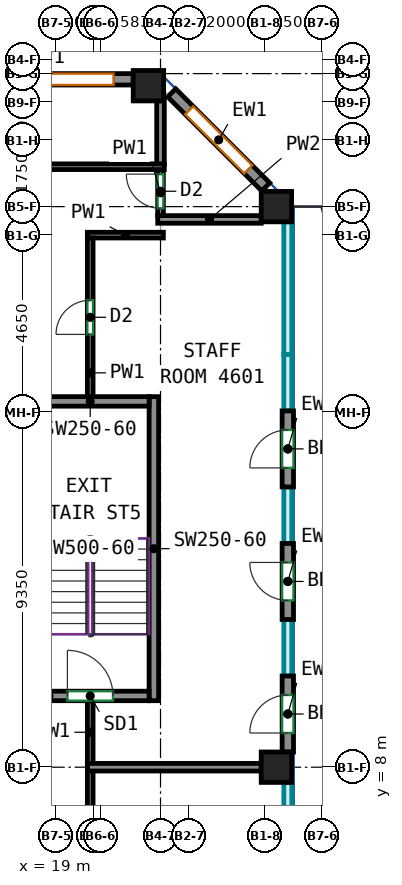
"""IFC4 building model, lengths in metres.
Left out: names, types, materials, properties, quantities, classifications, styles, units other than length and angle.
Written with IfcOpenShell. Run it as: python <this file> out.ifc"""

import sys

from ifc_helpers import new_model, si_unit, direction, frame, frame_2d, origin, origin_2d, place, context, subcontext, project, spatial, rectangle, extrude, source, transform, mapped, element, fill, save


model = new_model("IFC4")
c1 = context("Model", 3, precision=1e-05, world=origin(), true_north=direction((0.0, 1.0)))
c2 = subcontext(c1, "Body", "Model", "MODEL_VIEW")
j1 = project(units=[si_unit("LENGTHUNIT", "METRE"), si_unit("PLANEANGLEUNIT", "RADIAN")], contexts=[c1])
p1 = place(None, origin())
s1 = spatial("IfcSite", under=j1, at=p1, CompositionType="ELEMENT")
p2 = place(p1, origin())
s2 = spatial("IfcBuilding", under=s1, at=p2, CompositionType="ELEMENT")
p3 = place(p2, frame((0.0, 0.0, 192.3)))
s3 = spatial("IfcBuildingStorey", under=s2, at=p3, CompositionType="ELEMENT", Elevation=192.3)
m1 = source(origin(), c2, "Body", "SweptSolid", [
    extrude(rectangle(XDim=0.8, YDim=0.8, at=origin_2d()), origin(), (0.0, 0.0, 1.0), 3.0),
])
for number, where, z_axis, x_axis in (
    (1, (21.432, 25.932, 0.0), (0.0, 0.0, 1.0), (1.0, 0.0, 0.0)),
    (2, (24.8, 8.0, 0.0), (0.0, 0.0, 1.0), (1.0, 0.0, 0.0)),
    (3, (24.8, 22.75, 0.0), (0.0, 0.0, 1.0), (1.0, 0.0, 0.0)),
):
    element("IfcColumn", number, at=place(p3, frame(where, z_axis=z_axis, x_axis=x_axis)), inside=s3, PredefinedType="COLUMN", context=c2, shape_type="MappedRepresentation", body=[
        mapped(m1, transform((0.0, 0.0, 0.0))),
    ])
m2 = source(origin(), c2, "Body", "SweptSolid", [
    extrude(rectangle(XDim=8.0, YDim=0.25, at=frame_2d((4.0, 0.0))), origin(), (0.0, 0.0, 1.0), 3.0),
])
p4 = place(p3, frame((21.575, 9.75, 0.0), z_axis=(0.0, 0.0, 1.0), x_axis=(0.0, 1.0, 0.0)))
e4 = element("IfcWall", 4, at=p4, inside=s3, PredefinedType="SHEAR", context=c2, shape_type="MappedRepresentation", body=[
    mapped(m2, transform((0.0, 0.0, 0.0))),
])
m3 = source(origin(), c2, "Body", "SweptSolid", [
    extrude(rectangle(XDim=3.1, YDim=0.25, at=frame_2d((1.55, 0.0))), origin(), (0.0, 0.0, 1.0), 3.0),
])
p5 = place(p3, frame((18.35, 9.875, 0.0), z_axis=(0.0, 0.0, 1.0), x_axis=(1.0, 0.0, 0.0)))
e5 = element("IfcWall", 5, at=p5, inside=s3, PredefinedType="SHEAR", context=c2, shape_type="MappedRepresentation", body=[
    mapped(m3, transform((0.0, 0.0, 0.0))),
])
p6 = place(p5, frame((0.95, 0.0, 0.0)))
e6 = element("IfcOpeningElement", 6, at=p6, cuts=e5, PredefinedType="OPENING", context=c2, shape_type="SweptSolid", body=[
    extrude(rectangle(XDim=1.2, YDim=2.1, at=frame_2d((0.6, 1.05))), frame((0.0, 0.135, 0.0), z_axis=(0.0, -1.0, 0.0), x_axis=(1.0, 0.0, 0.0)), (0.0, 0.0, 1.0), 0.27),
])
p7 = place(p3, frame((18.35, 17.625, 0.0), z_axis=(0.0, 0.0, 1.0), x_axis=(1.0, 0.0, 0.0)))
e7 = element("IfcWall", 7, at=p7, inside=s3, PredefinedType="SHEAR", context=c2, shape_type="MappedRepresentation", body=[
    mapped(m3, transform((0.0, 0.0, 0.0))),
])
m4 = source(origin(), c2, "Body", "SweptSolid", [
    extrude(rectangle(XDim=2.0, YDim=0.3, at=frame_2d((1.0, 0.0))), origin(), (0.0, 0.0, 1.0), 3.0),
])
p8 = place(p3, frame((25.1, 8.4, 0.0), z_axis=(0.0, 0.0, 1.0), x_axis=(0.0, 1.0, 0.0)))
e8 = element("IfcWall", 8, at=p8, inside=s3, PredefinedType="SOLIDWALL", context=c2, shape_type="MappedRepresentation", body=[
    mapped(m4, transform((0.0, 0.0, 0.0))),
])
p9 = place(p8, frame((0.5, 0.0, 0.0)))
e9 = element("IfcOpeningElement", 9, at=p9, cuts=e8, PredefinedType="OPENING", context=c2, shape_type="SweptSolid", body=[
    extrude(rectangle(XDim=1.0, YDim=2.1, at=frame_2d((0.5, 1.05))), frame((0.0, 0.16, 0.0), z_axis=(0.0, -1.0, 0.0), x_axis=(1.0, 0.0, 0.0)), (0.0, 0.0, 1.0), 0.32),
])
p10 = place(p3, frame((25.1, 11.887, 0.0), z_axis=(0.0, 0.0, 1.0), x_axis=(0.0, 1.0, 0.0)))
e10 = element("IfcWall", 10, at=p10, inside=s3, PredefinedType="SOLIDWALL", context=c2, shape_type="MappedRepresentation", body=[
    mapped(m4, transform((0.0, 0.0, 0.0))),
])
p11 = place(p10, frame((0.5, 0.0, 0.0)))
e11 = element("IfcOpeningElement", 11, at=p11, cuts=e10, PredefinedType="OPENING", context=c2, shape_type="SweptSolid", body=[
    extrude(rectangle(XDim=1.0, YDim=2.1, at=frame_2d((0.5, 1.05))), frame((0.0, 0.16, 0.0), z_axis=(0.0, -1.0, 0.0), x_axis=(1.0, 0.0, 0.0)), (0.0, 0.0, 1.0), 0.32),
])
p12 = place(p3, frame((25.1, 15.375, 0.0), z_axis=(0.0, 0.0, 1.0), x_axis=(0.0, 1.0, 0.0)))
e12 = element("IfcWall", 12, at=p12, inside=s3, PredefinedType="SOLIDWALL", context=c2, shape_type="MappedRepresentation", body=[
    mapped(m4, transform((0.0, 0.0, 0.0))),
])
p13 = place(p12, frame((0.5, 0.0, 0.0)))
e13 = element("IfcOpeningElement", 13, at=p13, cuts=e12, PredefinedType="OPENING", context=c2, shape_type="SweptSolid", body=[
    extrude(rectangle(XDim=1.0, YDim=2.1, at=frame_2d((0.5, 1.05))), frame((0.0, 0.16, 0.0), z_axis=(0.0, -1.0, 0.0), x_axis=(1.0, 0.0, 0.0)), (0.0, 0.0, 1.0), 0.32),
])
m5 = source(origin(), c2, "Body", "SweptSolid", [
    extrude(rectangle(XDim=3.5, YDim=0.3, at=frame_2d((1.75, 0.0))), origin(), (0.0, 0.0, 1.0), 3.0),
])
p14 = place(p3, frame((24.519, 23.269, 0.0), z_axis=(0.0, 0.0, 1.0), x_axis=(-0.70707190453, 0.707141656123, 0.0)))
e14 = element("IfcWall", 14, at=p14, inside=s3, PredefinedType="SOLIDWALL", context=c2, shape_type="MappedRepresentation", body=[
    mapped(m5, transform((0.0, 0.0, 0.0))),
])
p15 = place(p14, frame((0.65, 0.0, 0.85)))
e15 = element("IfcOpeningElement", 15, at=p15, cuts=e14, PredefinedType="OPENING", context=c2, shape_type="SweptSolid", body=[
    extrude(rectangle(XDim=2.2, YDim=1.95, at=frame_2d((1.1, 0.975))), frame((0.0, 0.16, 0.0), z_axis=(0.0, -1.0, 0.0), x_axis=(1.0, 0.0, 0.0)), (0.0, 0.0, 1.0), 0.32),
])
m6 = source(origin(), c2, "Body", "SweptSolid", [
    extrude(rectangle(XDim=6.465, YDim=0.3, at=frame_2d((3.232, 0.0))), origin(), (0.0, 0.0, 1.0), 3.0),
])
p16 = place(p3, frame((21.032, 26.1, 0.0), z_axis=(0.0, 0.0, 1.0), x_axis=(-1.0, 0.0, 0.0)))
e16 = element("IfcWall", 16, at=p16, inside=s3, PredefinedType="SOLIDWALL", context=c2, shape_type="MappedRepresentation", body=[
    mapped(m6, transform((0.0, 0.0, 0.0))),
])
p17 = place(p16, frame((0.516, 0.0, 0.85)))
e17 = element("IfcOpeningElement", 17, at=p17, cuts=e16, PredefinedType="OPENING", context=c2, shape_type="SweptSolid", body=[
    extrude(rectangle(XDim=2.2, YDim=1.95, at=frame_2d((1.1, 0.975))), frame((0.0, 0.16, 0.0), z_axis=(0.0, -1.0, 0.0), x_axis=(1.0, 0.0, 0.0)), (0.0, 0.0, 1.0), 0.32),
])
p18 = place(p16, frame((3.749, 0.0, 0.85)))
e18 = element("IfcOpeningElement", 18, at=p18, cuts=e16, PredefinedType="OPENING", context=c2, shape_type="SweptSolid", body=[
    extrude(rectangle(XDim=2.2, YDim=1.95, at=frame_2d((1.1, 0.975))), frame((0.0, 0.16, 0.0), z_axis=(0.0, -1.0, 0.0), x_axis=(1.0, 0.0, 0.0)), (0.0, 0.0, 1.0), 0.32),
])
p19 = place(p3, frame((19.9, 3.809, 0.0), z_axis=(0.0, 0.0, 1.0), x_axis=(0.0, 1.0, 0.0)))
e19 = element("IfcWall", 19, at=p19, inside=s3, PredefinedType="PARTITIONING", context=c2, shape_type="SweptSolid", body=[
    extrude(rectangle(XDim=4.101, YDim=0.15, at=frame_2d((2.05, 0.0))), origin(), (0.0, 0.0, 1.0), 3.0),
])
p20 = place(p19, frame((1.1, 0.0, 0.0)))
e20 = element("IfcOpeningElement", 20, at=p20, cuts=e19, PredefinedType="OPENING", context=c2, shape_type="SweptSolid", body=[
    extrude(rectangle(XDim=0.9, YDim=2.1, at=frame_2d((0.45, 1.05))), frame((0.0, 0.085, 0.0), z_axis=(0.0, -1.0, 0.0), x_axis=(1.0, 0.0, 0.0)), (0.0, 0.0, 1.0), 0.17),
])
p21 = place(p3, frame((19.825, 22.0, 0.0), z_axis=(0.0, 0.0, 1.0), x_axis=(1.0, 0.0, 0.0)))
e21 = element("IfcWall", 21, at=p21, inside=s3, PredefinedType="PARTITIONING", context=c2, shape_type="SweptSolid", body=[
    extrude(rectangle(XDim=2.0, YDim=0.15, at=frame_2d((1.0, 0.0))), origin(), (0.0, 0.0, 1.0), 3.0),
])
p22 = place(p3, frame((19.9, 17.75, 0.0), z_axis=(0.0, 0.0, 1.0), x_axis=(0.0, 1.0, 0.0)))
e22 = element("IfcWall", 22, at=p22, inside=s3, PredefinedType="PARTITIONING", context=c2, shape_type="SweptSolid", body=[
    extrude(rectangle(XDim=4.175, YDim=0.15, at=frame_2d((2.087, 0.0))), origin(), (0.0, 0.0, 1.0), 3.0),
])
p23 = place(p22, frame((1.638, 0.0, 0.0)))
e23 = element("IfcOpeningElement", 23, at=p23, cuts=e22, PredefinedType="OPENING", context=c2, shape_type="SweptSolid", body=[
    extrude(rectangle(XDim=0.9, YDim=2.1, at=frame_2d((0.45, 1.05))), frame((0.0, 0.085, 0.0), z_axis=(0.0, -1.0, 0.0), x_axis=(1.0, 0.0, 0.0)), (0.0, 0.0, 1.0), 0.17),
])
p24 = place(p3, frame((19.9, 8.09, 0.0), z_axis=(0.0, 0.0, 1.0), x_axis=(0.0, 1.0, 0.0)))
e24 = element("IfcWall", 24, at=p24, inside=s3, PredefinedType="PARTITIONING", context=c2, shape_type="SweptSolid", body=[
    extrude(rectangle(XDim=1.66, YDim=0.15, at=frame_2d((0.83, 0.0))), origin(), (0.0, 0.0, 1.0), 3.0),
])
p25 = place(p3, frame((21.75, 22.503, 0.0), z_axis=(0.0, 0.0, 1.0), x_axis=(0.0, 1.0, 0.0)))
e25 = element("IfcWall", 25, at=p25, inside=s3, PredefinedType="PARTITIONING", context=c2, shape_type="SweptSolid", body=[
    extrude(rectangle(XDim=1.222, YDim=0.15, at=frame_2d((0.611, 0.0))), origin(), (0.0, 0.0, 1.0), 3.0),
])
p26 = place(p25, frame((0.202, 0.0, 0.0)))
e26 = element("IfcOpeningElement", 26, at=p26, cuts=e25, PredefinedType="OPENING", context=c2, shape_type="SweptSolid", body=[
    extrude(rectangle(XDim=0.9, YDim=2.1, at=frame_2d((0.45, 1.05))), frame((0.0, 0.085, 0.0), z_axis=(0.0, -1.0, 0.0), x_axis=(1.0, 0.0, 0.0)), (0.0, 0.0, 1.0), 0.17),
])
p27 = place(p3, frame((-20.059, 23.8, 0.0), z_axis=(0.0, 0.0, 1.0), x_axis=(1.0, 0.0, 0.0)))
e27 = element("IfcWall", 27, at=p27, inside=s3, PredefinedType="PARTITIONING", context=c2, shape_type="SweptSolid", body=[
    extrude(rectangle(XDim=41.909, YDim=0.15, at=frame_2d((20.955, 0.0))), origin(), (0.0, 0.0, 1.0), 3.0),
])
p28 = place(p27, frame((4.718, 0.0, 0.0)))
e28 = element("IfcOpeningElement", 28, at=p28, cuts=e27, PredefinedType="OPENING", context=c2, shape_type="SweptSolid", body=[
    extrude(rectangle(XDim=0.9, YDim=2.1, at=frame_2d((0.45, 1.05))), frame((0.0, 0.085, 0.0), z_axis=(0.0, -1.0, 0.0), x_axis=(1.0, 0.0, 0.0)), (0.0, 0.0, 1.0), 0.17),
])
p29 = place(p27, frame((30.079, 0.0, 0.0)))
e29 = element("IfcOpeningElement", 29, at=p29, cuts=e27, PredefinedType="OPENING", context=c2, shape_type="SweptSolid", body=[
    extrude(rectangle(XDim=1.0, YDim=2.1, at=frame_2d((0.5, 1.05))), frame((0.0, 0.085, 0.0), z_axis=(0.0, -1.0, 0.0), x_axis=(1.0, 0.0, 0.0)), (0.0, 0.0, 1.0), 0.17),
])
p30 = place(p3, frame((19.827, 8.0, 0.0), z_axis=(0.0, 0.0, 1.0), x_axis=(1.0, 0.0, 0.0)))
e30 = element("IfcWall", 30, at=p30, inside=s3, PredefinedType="PARTITIONING", context=c2, shape_type="SweptSolid", body=[
    extrude(rectangle(XDim=4.573, YDim=0.2, at=frame_2d((2.287, 0.0))), origin(), (0.0, 0.0, 1.0), 3.0),
])
p31 = place(p3, frame((24.4, 22.413, 0.0), z_axis=(0.0, 0.0, 1.0), x_axis=(-1.0, 0.0, 0.0)))
e31 = element("IfcWall", 31, at=p31, inside=s3, PredefinedType="PARTITIONING", context=c2, shape_type="SweptSolid", body=[
    extrude(rectangle(XDim=2.723, YDim=0.2, at=frame_2d((1.361, 0.0))), origin(), (0.0, 0.0, 1.0), 2.4),
])
p32 = place(p3, frame((21.75, 25.532, 0.0), z_axis=(0.0, 0.0, 1.0), x_axis=(0.0, -1.0, 0.0)))
e32 = element("IfcWall", 32, at=p32, inside=s3, PredefinedType="PARTITIONING", context=c2, shape_type="SweptSolid", body=[
    extrude(rectangle(XDim=1.655, YDim=0.2, at=frame_2d((0.828, 0.0))), origin(), (0.0, 0.0, 1.0), 3.0),
])
p33 = place(p9, origin())
e33 = element("IfcDoor", 33, at=p33, inside=s3, OperationType="SINGLE_SWING_LEFT", PredefinedType="DOOR", context=c2, shape_type="SweptSolid", body=[
    extrude(rectangle(XDim=1.0, YDim=2.1, at=frame_2d((0.5, 1.05))), frame((0.0, 0.025, 0.0), z_axis=(0.0, -1.0, 0.0), x_axis=(1.0, 0.0, 0.0)), (0.0, 0.0, 1.0), 0.05),
])
fill(e9, e33)
p34 = place(p11, origin())
e34 = element("IfcDoor", 34, at=p34, inside=s3, OperationType="SINGLE_SWING_RIGHT", PredefinedType="DOOR", context=c2, shape_type="SweptSolid", body=[
    extrude(rectangle(XDim=1.0, YDim=2.1, at=frame_2d((0.5, 1.05))), frame((0.0, 0.025, 0.0), z_axis=(0.0, -1.0, 0.0), x_axis=(1.0, 0.0, 0.0)), (0.0, 0.0, 1.0), 0.05),
])
fill(e11, e34)
p35 = place(p13, origin())
e35 = element("IfcDoor", 35, at=p35, inside=s3, OperationType="SINGLE_SWING_LEFT", PredefinedType="DOOR", context=c2, shape_type="SweptSolid", body=[
    extrude(rectangle(XDim=1.0, YDim=2.1, at=frame_2d((0.5, 1.05))), frame((0.0, 0.025, 0.0), z_axis=(0.0, -1.0, 0.0), x_axis=(1.0, 0.0, 0.0)), (0.0, 0.0, 1.0), 0.05),
])
fill(e13, e35)
p36 = place(p15, origin())
e36 = element("IfcWindow", 36, at=p36, inside=s3, PartitioningType="SINGLE_PANEL", PredefinedType="WINDOW", context=c2, shape_type="SweptSolid", body=[
    extrude(rectangle(XDim=2.2, YDim=1.95, at=frame_2d((1.1, 0.975))), frame((0.0, 0.03, 0.0), z_axis=(0.0, -1.0, 0.0), x_axis=(1.0, 0.0, 0.0)), (0.0, 0.0, 1.0), 0.06),
])
fill(e15, e36)
p37 = place(p17, origin())
e37 = element("IfcWindow", 37, at=p37, inside=s3, PartitioningType="SINGLE_PANEL", PredefinedType="WINDOW", context=c2, shape_type="SweptSolid", body=[
    extrude(rectangle(XDim=2.2, YDim=1.95, at=frame_2d((1.1, 0.975))), frame((0.0, 0.03, 0.0), z_axis=(0.0, -1.0, 0.0), x_axis=(1.0, 0.0, 0.0)), (0.0, 0.0, 1.0), 0.06),
])
fill(e17, e37)
p38 = place(p6, origin())
e38 = element("IfcDoor", 38, at=p38, inside=s3, OperationType="DOUBLE_DOOR_SINGLE_SWING", PredefinedType="DOOR", context=c2, shape_type="SweptSolid", body=[
    extrude(rectangle(XDim=1.2, YDim=2.1, at=frame_2d((0.6, 1.05))), frame((0.0, 0.025, 0.0), z_axis=(0.0, -1.0, 0.0), x_axis=(1.0, 0.0, 0.0)), (0.0, 0.0, 1.0), 0.05),
])
fill(e6, e38)
p39 = place(p23, origin())
e39 = element("IfcDoor", 39, at=p39, inside=s3, OperationType="SINGLE_SWING_LEFT", PredefinedType="DOOR", context=c2, shape_type="SweptSolid", body=[
    extrude(rectangle(XDim=0.9, YDim=2.1, at=frame_2d((0.45, 1.05))), frame((0.0, 0.025, 0.0), z_axis=(0.0, -1.0, 0.0), x_axis=(1.0, 0.0, 0.0)), (0.0, 0.0, 1.0), 0.05),
])
fill(e23, e39)
p40 = place(p26, origin())
e40 = element("IfcDoor", 40, at=p40, inside=s3, OperationType="SINGLE_SWING_RIGHT", PredefinedType="DOOR", context=c2, shape_type="SweptSolid", body=[
    extrude(rectangle(XDim=0.9, YDim=2.1, at=frame_2d((0.45, 1.05))), frame((0.0, 0.025, 0.0), z_axis=(0.0, -1.0, 0.0), x_axis=(1.0, 0.0, 0.0)), (0.0, 0.0, 1.0), 0.05),
])
fill(e26, e40)
save(model, sys.argv[1])
